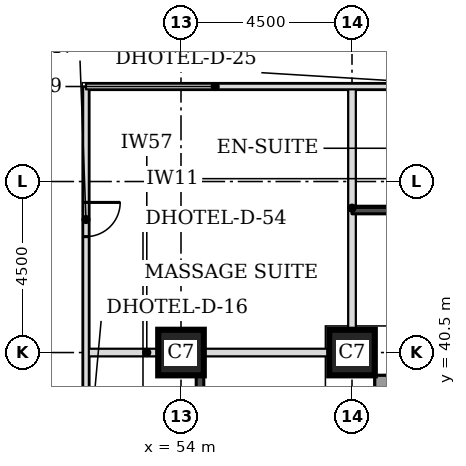
"""IFC4 building model, lengths in metres.
Left out: names, types, materials, properties, quantities, classifications, styles, units other than length and angle.
Written with IfcOpenShell. Run it as: python <this file> out.ifc"""

import sys

from ifc_helpers import new_model, si_unit, direction, frame, frame_2d, origin, origin_2d, place, context, subcontext, project, spatial, rectangle, extrude, element, fill, save


model = new_model("IFC4")
c1 = context("Model", 3, precision=1e-05, world=origin(), true_north=direction((0.0, 1.0)))
c2 = subcontext(c1, "Body", "Model", "MODEL_VIEW")
j1 = project(units=[si_unit("LENGTHUNIT", "METRE"), si_unit("PLANEANGLEUNIT", "RADIAN")], contexts=[c1])
p1 = place(None, origin())
s1 = spatial("IfcSite", under=j1, at=p1, CompositionType="ELEMENT")
p2 = place(p1, origin())
s2 = spatial("IfcBuilding", under=s1, at=p2, CompositionType="ELEMENT")
p3 = place(p2, frame((0.0, 0.0, 36.3)))
s3 = spatial("IfcBuildingStorey", under=s2, at=p3, CompositionType="ELEMENT", Elevation=36.3)
for number, where, z_axis, x_axis in (
    (1, (54.0, 40.5, 0.0), (0.0, 0.0, 1.0), (1.0, 0.0, 0.0)),
    (2, (58.5, 40.5, 0.0), (0.0, 0.0, 1.0), (1.0, 0.0, 0.0)),
):
    element("IfcColumn", number, at=place(p3, frame(where, z_axis=z_axis, x_axis=x_axis)), inside=s3, PredefinedType="COLUMN", context=c2, shape_type="SweptSolid", body=[
        extrude(rectangle(XDim=1.2, YDim=1.2, at=origin_2d()), origin(), (0.0, 0.0, 1.0), 3.3),
    ])
p4 = place(p3, frame((59.275, 22.106, 0.0), z_axis=(0.0, 0.0, 1.0), x_axis=(0.0, 1.0, 0.0)))
e3 = element("IfcWall", 3, at=p4, inside=s3, PredefinedType="STANDARD", context=c2, shape_type="SweptSolid", body=[
    extrude(rectangle(XDim=17.793, YDim=0.35, at=frame_2d((8.897, 0.0))), origin(), (0.0, 0.0, 1.0), 3.055),
])
p5 = place(p4, frame((5.493, 0.0, 0.8)))
e4 = element("IfcOpeningElement", 4, at=p5, cuts=e3, PredefinedType="OPENING", context=c2, shape_type="SweptSolid", body=[
    extrude(rectangle(XDim=3.3, YDim=1.5, at=frame_2d((1.65, 0.75))), frame((0.0, 0.185, 0.0), z_axis=(0.0, -1.0, 0.0), x_axis=(1.0, 0.0, 0.0)), (0.0, 0.0, 1.0), 0.37),
])
p6 = place(p4, frame((13.993, 0.0, 0.8)))
e5 = element("IfcOpeningElement", 5, at=p6, cuts=e3, PredefinedType="OPENING", context=c2, shape_type="SweptSolid", body=[
    extrude(rectangle(XDim=3.3, YDim=1.5, at=frame_2d((1.65, 0.75))), frame((0.0, 0.185, 0.0), z_axis=(0.0, -1.0, 0.0), x_axis=(1.0, 0.0, 0.0)), (0.0, 0.0, 1.0), 0.37),
])
p7 = place(p3, frame((59.1, 39.725, 0.0), z_axis=(0.0, 0.0, 1.0), x_axis=(1.0, 0.0, 0.0)))
e6 = element("IfcWall", 6, at=p7, inside=s3, PredefinedType="STANDARD", context=c2, shape_type="SweptSolid", body=[
    extrude(rectangle(XDim=13.293, YDim=0.35, at=frame_2d((6.647, 0.0))), origin(), (0.0, 0.0, 1.0), 3.055),
])
p8 = place(p7, frame((0.5, 0.0, 0.8)))
e7 = element("IfcOpeningElement", 7, at=p8, cuts=e6, PredefinedType="OPENING", context=c2, shape_type="SweptSolid", body=[
    extrude(rectangle(XDim=3.3, YDim=1.5, at=frame_2d((1.65, 0.75))), frame((0.0, 0.185, 0.0), z_axis=(0.0, -1.0, 0.0), x_axis=(1.0, 0.0, 0.0)), (0.0, 0.0, 1.0), 0.37),
])
p9 = place(p3, frame((51.5, 40.5, 0.0), z_axis=(0.0, 0.0, 1.0), x_axis=(1.0, 0.0, 0.0)))
e8 = element("IfcWall", 8, at=p9, inside=s3, PredefinedType="PARTITIONING", context=c2, shape_type="SweptSolid", body=[
    extrude(rectangle(XDim=6.4, YDim=0.2, at=frame_2d((3.2, 0.0))), origin(), (0.0, 0.0, 1.0), 2.33),
])
p10 = place(p3, frame((58.5, 41.1, 0.0), z_axis=(0.0, 0.0, 1.0), x_axis=(0.0, 1.0, 0.0)))
e9 = element("IfcWall", 9, at=p10, inside=s3, PredefinedType="PARTITIONING", context=c2, shape_type="SweptSolid", body=[
    extrude(rectangle(XDim=6.4, YDim=0.2, at=frame_2d((3.2, 0.0))), origin(), (0.0, 0.0, 1.0), 3.08),
])
p11 = place(p3, frame((51.5, 25.15, 0.0), z_axis=(0.0, 0.0, 1.0), x_axis=(0.0, 1.0, 0.0)))
e10 = element("IfcWall", 10, at=p11, inside=s3, PredefinedType="PARTITIONING", context=c2, shape_type="SweptSolid", body=[
    extrude(rectangle(XDim=22.35, YDim=0.15, at=frame_2d((11.175, 0.0))), origin(), (0.0, 0.0, 1.0), 3.08),
])
p12 = place(p11, frame((0.347, 0.0, 0.0)))
e11 = element("IfcOpeningElement", 11, at=p12, cuts=e10, PredefinedType="OPENING", context=c2, shape_type="SweptSolid", body=[
    extrude(rectangle(XDim=1.0, YDim=2.1, at=frame_2d((0.5, 1.05))), frame((0.0, 0.085, 0.0), z_axis=(0.0, -1.0, 0.0), x_axis=(1.0, 0.0, 0.0)), (0.0, 0.0, 1.0), 0.17),
])
p13 = place(p11, frame((2.3, 0.0, 0.0)))
e12 = element("IfcOpeningElement", 12, at=p13, cuts=e10, PredefinedType="OPENING", context=c2, shape_type="SweptSolid", body=[
    extrude(rectangle(XDim=1.0, YDim=2.1, at=frame_2d((0.5, 1.05))), frame((0.0, 0.085, 0.0), z_axis=(0.0, -1.0, 0.0), x_axis=(1.0, 0.0, 0.0)), (0.0, 0.0, 1.0), 0.17),
])
p14 = place(p11, frame((9.15, 0.0, 0.0)))
e13 = element("IfcOpeningElement", 13, at=p14, cuts=e10, PredefinedType="OPENING", context=c2, shape_type="SweptSolid", body=[
    extrude(rectangle(XDim=1.0, YDim=2.1, at=frame_2d((0.5, 1.05))), frame((0.0, 0.085, 0.0), z_axis=(0.0, -1.0, 0.0), x_axis=(1.0, 0.0, 0.0)), (0.0, 0.0, 1.0), 0.17),
])
p15 = place(p11, frame((11.3, 0.0, 0.0)))
e14 = element("IfcOpeningElement", 14, at=p15, cuts=e10, PredefinedType="OPENING", context=c2, shape_type="SweptSolid", body=[
    extrude(rectangle(XDim=1.0, YDim=2.1, at=frame_2d((0.5, 1.05))), frame((0.0, 0.085, 0.0), z_axis=(0.0, -1.0, 0.0), x_axis=(1.0, 0.0, 0.0)), (0.0, 0.0, 1.0), 0.17),
])
p16 = place(p11, frame((18.4, 0.0, 0.0)))
e15 = element("IfcOpeningElement", 15, at=p16, cuts=e10, PredefinedType="OPENING", context=c2, shape_type="SweptSolid", body=[
    extrude(rectangle(XDim=0.9, YDim=2.1, at=frame_2d((0.45, 1.05))), frame((0.0, 0.085, 0.0), z_axis=(0.0, -1.0, 0.0), x_axis=(1.0, 0.0, 0.0)), (0.0, 0.0, 1.0), 0.17),
])
p17 = place(p3, frame((51.5, 47.5, 0.0), z_axis=(0.0, 0.0, 1.0), x_axis=(1.0, 0.0, 0.0)))
e16 = element("IfcWall", 16, at=p17, inside=s3, PredefinedType="PARTITIONING", context=c2, shape_type="SweptSolid", body=[
    extrude(rectangle(XDim=18.0, YDim=0.15, at=frame_2d((9.0, 0.0))), origin(), (0.0, 0.0, 1.0), 3.08),
])
p18 = place(p17, frame((12.2, 0.0, 0.0)))
e17 = element("IfcOpeningElement", 17, at=p18, cuts=e16, PredefinedType="OPENING", context=c2, shape_type="SweptSolid", body=[
    extrude(rectangle(XDim=1.0, YDim=2.1, at=frame_2d((0.5, 1.05))), frame((0.0, 0.085, 0.0), z_axis=(0.0, -1.0, 0.0), x_axis=(1.0, 0.0, 0.0)), (0.0, 0.0, 1.0), 0.17),
])
p19 = place(p17, frame((10.05, 0.0, 0.0)))
e18 = element("IfcOpeningElement", 18, at=p19, cuts=e16, PredefinedType="OPENING", context=c2, shape_type="SweptSolid", body=[
    extrude(rectangle(XDim=1.0, YDim=2.1, at=frame_2d((0.5, 1.05))), frame((0.0, 0.085, 0.0), z_axis=(0.0, -1.0, 0.0), x_axis=(1.0, 0.0, 0.0)), (0.0, 0.0, 1.0), 0.17),
])
p20 = place(p17, frame((16.5, 0.0, 0.0)))
e19 = element("IfcOpeningElement", 19, at=p20, cuts=e16, PredefinedType="OPENING", context=c2, shape_type="SweptSolid", body=[
    extrude(rectangle(XDim=1.0, YDim=2.1, at=frame_2d((0.5, 1.05))), frame((0.0, 0.085, 0.0), z_axis=(0.0, -1.0, 0.0), x_axis=(1.0, 0.0, 0.0)), (0.0, 0.0, 1.0), 0.17),
])
for number, where, z_axis, x_axis in (
    (20, (54.5, 37.9, 0.0), (0.0, 0.0, 1.0), (0.0, 1.0, 0.0)),
    (21, (58.5, 44.25, 0.0), (0.0, 0.0, 1.0), (1.0, 0.0, 0.0)),
):
    element("IfcWall", number, at=place(p3, frame(where, z_axis=z_axis, x_axis=x_axis)), inside=s3, PredefinedType="SOLIDWALL", context=c2, shape_type="SweptSolid", body=[
        extrude(rectangle(XDim=2.6, YDim=0.2, at=frame_2d((1.3, 0.0))), origin(), (0.0, 0.0, 1.0), 3.08),
    ])
p21 = place(p16, frame((0.9, 0.0, 0.0), z_axis=(0.0, 0.0, 1.0), x_axis=(-1.0, 0.0, 0.0)))
e22 = element("IfcDoor", 22, at=p21, inside=s3, OperationType="SINGLE_SWING_LEFT", PredefinedType="DOOR", context=c2, shape_type="SweptSolid", body=[
    extrude(rectangle(XDim=0.9, YDim=2.1, at=frame_2d((0.45, 1.05))), frame((0.0, 0.025, 0.0), z_axis=(0.0, -1.0, 0.0), x_axis=(1.0, 0.0, 0.0)), (0.0, 0.0, 1.0), 0.05),
])
fill(e15, e22)
save(model, sys.argv[1])
